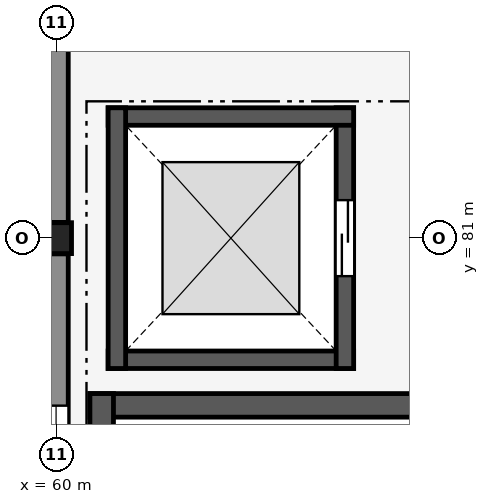
"""IFC4 building model, lengths in metres.
Left out: names, types, materials, properties, quantities, classifications, styles, units other than length and angle.
Written with IfcOpenShell. Run it as: python <this file> out.ifc"""

import sys

from ifc_helpers import new_model, si_unit, direction, frame, frame_2d, origin, origin_2d, place, context, subcontext, project, spatial, rectangle, hollow_circle, extrude, element, fill, save


model = new_model("IFC4")
c1 = context("Model", 3, precision=1e-05, world=origin(), true_north=direction((0.0, 1.0)))
c2 = subcontext(c1, "Body", "Model", "MODEL_VIEW")
j1 = project(units=[si_unit("LENGTHUNIT", "METRE"), si_unit("PLANEANGLEUNIT", "RADIAN")], contexts=[c1])
p1 = place(None, origin())
s1 = spatial("IfcSite", under=j1, at=p1, CompositionType="ELEMENT")
p2 = place(p1, origin())
s2 = spatial("IfcBuilding", under=s1, at=p2, CompositionType="ELEMENT")
p3 = place(p2, frame((0.0, 0.0, 9.3)))
s3 = spatial("IfcBuildingStorey", under=s2, at=p3, CompositionType="ELEMENT", Elevation=9.3)
p4 = place(p3, frame((60.0, 81.0, 0.0), z_axis=(0.0, 0.0, 1.0), x_axis=(1.0, 0.0, 0.0)))
e1 = element("IfcColumn", 1, at=p4, inside=s3, PredefinedType="COLUMN", context=c2, shape_type="SweptSolid", body=[
    extrude(hollow_circle(Radius=0.203, WallThickness=0.016, at=origin_2d()), origin(), (0.0, 0.0, 1.0), 4.2),
])
p5 = place(p3, frame((60.0, 75.0, 0.0), z_axis=(0.0, 0.0, 1.0), x_axis=(0.0, 1.0, 0.0)))
e2 = element("IfcWall", 2, at=p5, inside=s3, PredefinedType="SOLIDWALL", context=c2, shape_type="SweptSolid", body=[
    extrude(rectangle(XDim=5.793, YDim=0.32, at=frame_2d((2.896, 0.0))), origin(), (0.0, 0.0, 1.0), 3.09),
])
p6 = place(p5, frame((1.996, 0.0, 1.1)))
e3 = element("IfcOpeningElement", 3, at=p6, cuts=e2, PredefinedType="OPENING", context=c2, shape_type="SweptSolid", body=[
    extrude(rectangle(XDim=1.8, YDim=1.2, at=frame_2d((0.9, 0.6))), frame((0.0, 0.17, 0.0), z_axis=(0.0, -1.0, 0.0), x_axis=(1.0, 0.0, 0.0)), (0.0, 0.0, 1.0), 0.34),
])
p7 = place(p3, frame((60.0, 81.207, 0.0), z_axis=(0.0, 0.0, 1.0), x_axis=(0.0, 1.0, 0.0)))
e4 = element("IfcWall", 4, at=p7, inside=s3, PredefinedType="SOLIDWALL", context=c2, shape_type="SweptSolid", body=[
    extrude(rectangle(XDim=5.639, YDim=0.32, at=frame_2d((2.819, 0.0))), origin(), (0.0, 0.0, 1.0), 3.09),
])
p8 = place(p3, frame((65.255, 78.8, 0.0), z_axis=(0.0, 0.0, 1.0), x_axis=(-1.0, 0.0, 0.0)))
e5 = element("IfcWall", 5, at=p8, inside=s3, PredefinedType="SHEAR", context=c2, shape_type="SweptSolid", body=[
    extrude(rectangle(XDim=4.81, YDim=0.31, at=frame_2d((2.405, 0.0))), origin(), (0.0, 0.0, 1.0), 4.06),
])
p9 = place(p3, frame((60.6, 78.955, 0.0), z_axis=(0.0, 0.0, 1.0), x_axis=(0.0, -1.0, 0.0)))
e6 = element("IfcWall", 6, at=p9, inside=s3, PredefinedType="SHEAR", context=c2, shape_type="SweptSolid", body=[
    extrude(rectangle(XDim=9.61, YDim=0.31, at=frame_2d((4.805, 0.0))), origin(), (0.0, 0.0, 1.0), 4.06),
])
p10 = place(p3, frame((60.685, 79.4, 0.0), z_axis=(0.0, 0.0, 1.0), x_axis=(1.0, 0.0, 0.0)))
e7 = element("IfcWall", 7, at=p10, inside=s3, PredefinedType="SHEAR", context=c2, shape_type="SweptSolid", body=[
    extrude(rectangle(XDim=3.23, YDim=0.23, at=frame_2d((1.615, 0.0))), origin(), (0.0, 0.0, 1.0), 4.2),
])
p11 = place(p3, frame((63.8, 79.285, 0.0), z_axis=(0.0, 0.0, 1.0), x_axis=(0.0, 1.0, 0.0)))
e8 = element("IfcWall", 8, at=p11, inside=s3, PredefinedType="SHEAR", context=c2, shape_type="SweptSolid", body=[
    extrude(rectangle(XDim=3.43, YDim=0.23, at=frame_2d((1.715, 0.0))), origin(), (0.0, 0.0, 1.0), 4.2),
])
p12 = place(p11, frame((1.215, 0.0, 0.0)))
e9 = element("IfcOpeningElement", 9, at=p12, cuts=e8, PredefinedType="OPENING", context=c2, shape_type="SweptSolid", body=[
    extrude(rectangle(XDim=1.0, YDim=2.15, at=frame_2d((0.5, 1.075))), frame((0.0, 0.125, 0.0), z_axis=(0.0, -1.0, 0.0), x_axis=(1.0, 0.0, 0.0)), (0.0, 0.0, 1.0), 0.25),
])
p13 = place(p3, frame((63.915, 82.6, 0.0), z_axis=(0.0, 0.0, 1.0), x_axis=(-1.0, 0.0, 0.0)))
e10 = element("IfcWall", 10, at=p13, inside=s3, PredefinedType="SHEAR", context=c2, shape_type="SweptSolid", body=[
    extrude(rectangle(XDim=3.23, YDim=0.23, at=frame_2d((1.615, 0.0))), origin(), (0.0, 0.0, 1.0), 4.2),
])
p14 = place(p3, frame((60.8, 82.715, 0.0), z_axis=(0.0, 0.0, 1.0), x_axis=(0.0, -1.0, 0.0)))
e11 = element("IfcWall", 11, at=p14, inside=s3, PredefinedType="SHEAR", context=c2, shape_type="SweptSolid", body=[
    extrude(rectangle(XDim=3.43, YDim=0.23, at=frame_2d((1.715, 0.0))), origin(), (0.0, 0.0, 1.0), 4.2),
])
p15 = place(p6, origin())
e12 = element("IfcWindow", 12, at=p15, inside=s3, PartitioningType="SINGLE_PANEL", PredefinedType="WINDOW", context=c2, shape_type="SweptSolid", body=[
    extrude(rectangle(XDim=1.8, YDim=1.2, at=frame_2d((0.9, 0.6))), frame((0.0, 0.03, 0.0), z_axis=(0.0, -1.0, 0.0), x_axis=(1.0, 0.0, 0.0)), (0.0, 0.0, 1.0), 0.06),
])
fill(e3, e12)
p16 = place(p12, origin())
e13 = element("IfcDoor", 13, at=p16, inside=s3, OperationType="SLIDING_TO_LEFT", PredefinedType="DOOR", context=c2, shape_type="SweptSolid", body=[
    extrude(rectangle(XDim=1.0, YDim=2.15, at=frame_2d((0.5, 1.075))), frame((0.0, 0.025, 0.0), z_axis=(0.0, -1.0, 0.0), x_axis=(1.0, 0.0, 0.0)), (0.0, 0.0, 1.0), 0.05),
])
fill(e9, e13)
save(model, sys.argv[1])
